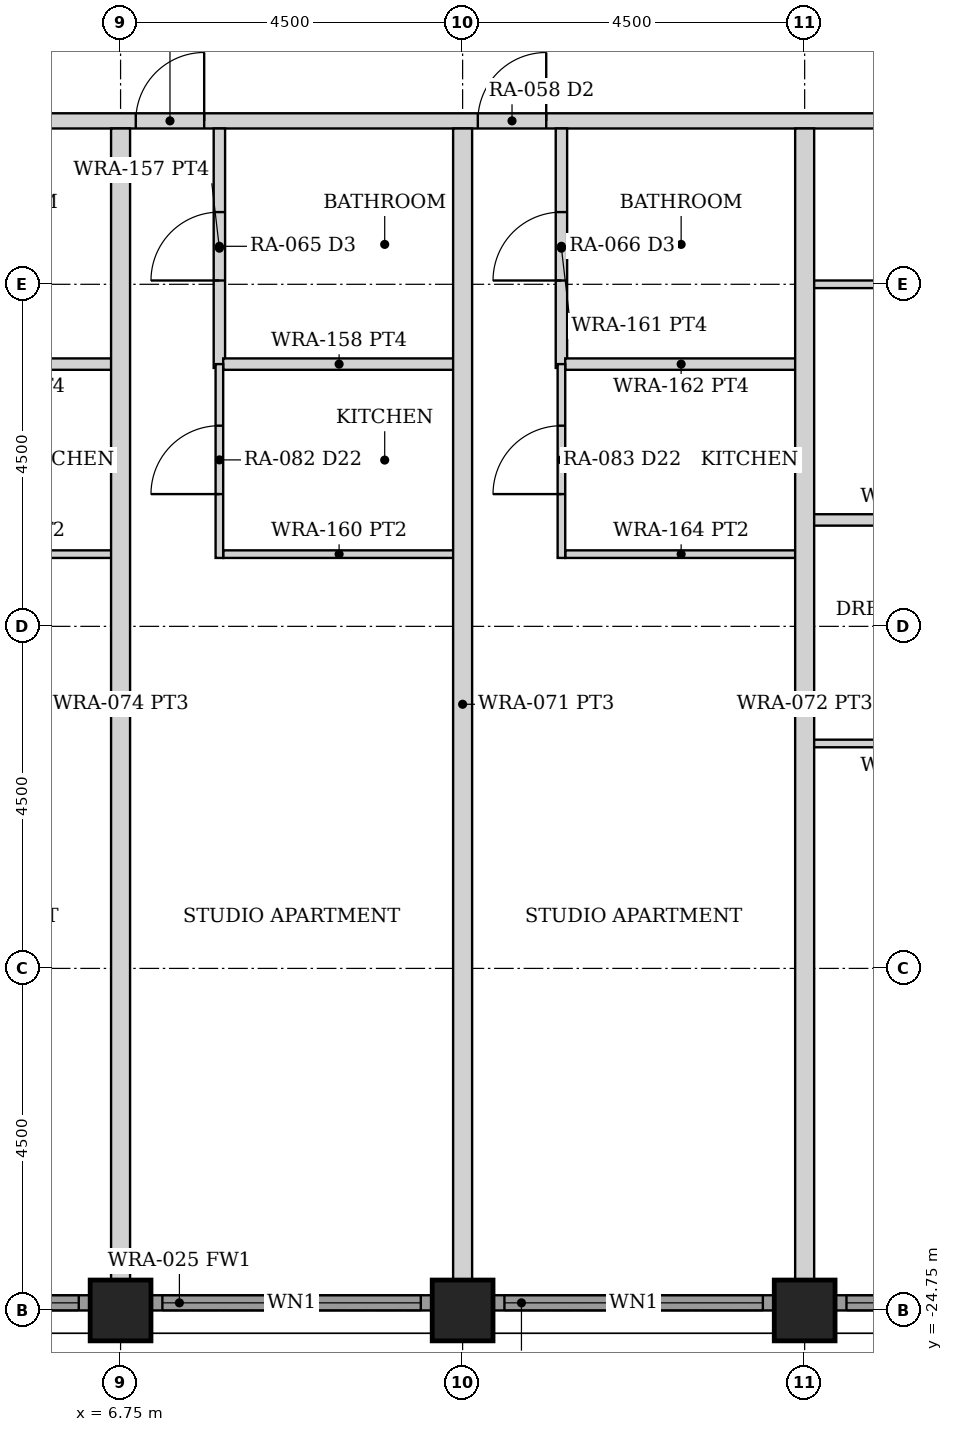
"""IFC4 building model, lengths in metres.
Left out: names, types, materials, properties, quantities, classifications, styles, units other than length and angle.
Written with IfcOpenShell. Run it as: python <this file> out.ifc"""

import sys

from ifc_helpers import new_model, si_unit, direction, frame, frame_2d, origin, origin_2d, place, context, subcontext, project, spatial, rectangle, hollow_rectangle, extrude, element, fill, save


model = new_model("IFC4")
c1 = context("Model", 3, precision=1e-05, world=origin(), true_north=direction((0.0, 1.0)))
c2 = subcontext(c1, "Body", "Model", "MODEL_VIEW")
j1 = project(units=[si_unit("LENGTHUNIT", "METRE"), si_unit("PLANEANGLEUNIT", "RADIAN")], contexts=[c1])
p1 = place(None, origin())
s1 = spatial("IfcSite", under=j1, at=p1, CompositionType="ELEMENT")
p2 = place(p1, origin())
s2 = spatial("IfcBuilding", under=s1, at=p2, CompositionType="ELEMENT")
p3 = place(p2, frame((0.0, 0.0, 30.0)))
s3 = spatial("IfcBuildingStorey", under=s2, at=p3, CompositionType="ELEMENT", Elevation=30.0)
for number, where, z_axis, x_axis in (
    (1, (6.75, -24.75, 0.0), (0.0, 0.0, 1.0), (0.0, 1.0, 0.0)),
    (2, (11.25, -24.75, 0.0), (0.0, 0.0, 1.0), (0.0, 1.0, 0.0)),
    (3, (15.75, -24.75, 0.0), (0.0, 0.0, 1.0), (0.0, 1.0, 0.0)),
):
    element("IfcColumn", number, at=place(p3, frame(where, z_axis=z_axis, x_axis=x_axis)), inside=s3, PredefinedType="COLUMN", context=c2, shape_type="SweptSolid", body=[
        extrude(hollow_rectangle(XDim=0.8, YDim=0.8, WallThickness=0.08, at=origin_2d()), origin(), (0.0, 0.0, 1.0), 3.5),
    ])
p4 = place(p3, frame((2.655, -24.65, 0.0), z_axis=(0.0, 0.0, 1.0), x_axis=(1.0, 0.0, 0.0)))
e4 = element("IfcWall", 4, at=p4, inside=s3, PredefinedType="SOLIDWALL", context=c2, shape_type="SweptSolid", body=[
    extrude(rectangle(XDim=3.69, YDim=0.2, at=frame_2d((1.845, 0.0))), origin(), (0.0, 0.0, 1.0), 2.379),
])
p5 = place(p4, frame((0.145, 0.0, 0.3)))
e5 = element("IfcOpeningElement", 5, at=p5, cuts=e4, PredefinedType="OPENING", context=c2, shape_type="SweptSolid", body=[
    extrude(rectangle(XDim=3.4, YDim=1.929, at=frame_2d((1.7, 0.964))), frame((0.0, 0.11, 0.0), z_axis=(0.0, -1.0, 0.0), x_axis=(1.0, 0.0, 0.0)), (0.0, 0.0, 1.0), 0.22),
])
p6 = place(p3, frame((7.155, -24.65, 0.0), z_axis=(0.0, 0.0, 1.0), x_axis=(1.0, 0.0, 0.0)))
e6 = element("IfcWall", 6, at=p6, inside=s3, PredefinedType="SOLIDWALL", context=c2, shape_type="SweptSolid", body=[
    extrude(rectangle(XDim=3.69, YDim=0.2, at=frame_2d((1.845, 0.0))), origin(), (0.0, 0.0, 1.0), 2.379),
])
p7 = place(p6, frame((0.145, 0.0, 0.3)))
e7 = element("IfcOpeningElement", 7, at=p7, cuts=e6, PredefinedType="OPENING", context=c2, shape_type="SweptSolid", body=[
    extrude(rectangle(XDim=3.4, YDim=1.929, at=frame_2d((1.7, 0.964))), frame((0.0, 0.11, 0.0), z_axis=(0.0, -1.0, 0.0), x_axis=(1.0, 0.0, 0.0)), (0.0, 0.0, 1.0), 0.22),
])
p8 = place(p3, frame((11.655, -24.65, 0.0), z_axis=(0.0, 0.0, 1.0), x_axis=(1.0, 0.0, 0.0)))
e8 = element("IfcWall", 8, at=p8, inside=s3, PredefinedType="SOLIDWALL", context=c2, shape_type="SweptSolid", body=[
    extrude(rectangle(XDim=3.69, YDim=0.2, at=frame_2d((1.845, 0.0))), origin(), (0.0, 0.0, 1.0), 2.379),
])
p9 = place(p8, frame((0.145, 0.0, 0.3)))
e9 = element("IfcOpeningElement", 9, at=p9, cuts=e8, PredefinedType="OPENING", context=c2, shape_type="SweptSolid", body=[
    extrude(rectangle(XDim=3.4, YDim=1.929, at=frame_2d((1.7, 0.964))), frame((0.0, 0.11, 0.0), z_axis=(0.0, -1.0, 0.0), x_axis=(1.0, 0.0, 0.0)), (0.0, 0.0, 1.0), 0.22),
])
p10 = place(p3, frame((16.155, -24.65, 0.0), z_axis=(0.0, 0.0, 1.0), x_axis=(1.0, 0.0, 0.0)))
e10 = element("IfcWall", 10, at=p10, inside=s3, PredefinedType="SOLIDWALL", context=c2, shape_type="SweptSolid", body=[
    extrude(rectangle(XDim=3.69, YDim=0.2, at=frame_2d((1.845, 0.0))), origin(), (0.0, 0.0, 1.0), 2.379),
])
p11 = place(p10, frame((0.145, 0.0, 0.3)))
e11 = element("IfcOpeningElement", 11, at=p11, cuts=e10, PredefinedType="OPENING", context=c2, shape_type="SweptSolid", body=[
    extrude(rectangle(XDim=3.4, YDim=1.929, at=frame_2d((1.7, 0.964))), frame((0.0, 0.11, 0.0), z_axis=(0.0, -1.0, 0.0), x_axis=(1.0, 0.0, 0.0)), (0.0, 0.0, 1.0), 0.22),
])
p12 = place(p3, frame((-24.55, -9.1, 0.0), z_axis=(0.0, 0.0, 1.0), x_axis=(1.0, 0.0, 0.0)))
e12 = element("IfcWall", 12, at=p12, inside=s3, PredefinedType="PARTITIONING", context=c2, shape_type="SweptSolid", body=[
    extrude(rectangle(XDim=49.1, YDim=0.2, at=frame_2d((24.55, 0.0))), origin(), (0.0, 0.0, 1.0), 2.373),
])
p13 = place(p12, frame((5.1, 0.0, 0.0)))
e13 = element("IfcOpeningElement", 13, at=p13, cuts=e12, PredefinedType="OPENING", context=c2, shape_type="SweptSolid", body=[
    extrude(rectangle(XDim=0.9, YDim=2.1, at=frame_2d((0.45, 1.05))), frame((0.0, 0.11, 0.0), z_axis=(0.0, -1.0, 0.0), x_axis=(1.0, 0.0, 0.0)), (0.0, 0.0, 1.0), 0.22),
])
p14 = place(p12, frame((9.0, 0.0, 0.0)))
e14 = element("IfcOpeningElement", 14, at=p14, cuts=e12, PredefinedType="OPENING", context=c2, shape_type="SweptSolid", body=[
    extrude(rectangle(XDim=0.9, YDim=2.1, at=frame_2d((0.45, 1.05))), frame((0.0, 0.11, 0.0), z_axis=(0.0, -1.0, 0.0), x_axis=(1.0, 0.0, 0.0)), (0.0, 0.0, 1.0), 0.22),
])
p15 = place(p12, frame((13.5, 0.0, 0.0)))
e15 = element("IfcOpeningElement", 15, at=p15, cuts=e12, PredefinedType="OPENING", context=c2, shape_type="SweptSolid", body=[
    extrude(rectangle(XDim=0.9, YDim=2.1, at=frame_2d((0.45, 1.05))), frame((0.0, 0.11, 0.0), z_axis=(0.0, -1.0, 0.0), x_axis=(1.0, 0.0, 0.0)), (0.0, 0.0, 1.0), 0.22),
])
p16 = place(p12, frame((18.0, 0.0, 0.0)))
e16 = element("IfcOpeningElement", 16, at=p16, cuts=e12, PredefinedType="OPENING", context=c2, shape_type="SweptSolid", body=[
    extrude(rectangle(XDim=0.9, YDim=2.1, at=frame_2d((0.45, 1.05))), frame((0.0, 0.11, 0.0), z_axis=(0.0, -1.0, 0.0), x_axis=(1.0, 0.0, 0.0)), (0.0, 0.0, 1.0), 0.22),
])
p17 = place(p12, frame((22.5, 0.0, 0.0)))
e17 = element("IfcOpeningElement", 17, at=p17, cuts=e12, PredefinedType="OPENING", context=c2, shape_type="SweptSolid", body=[
    extrude(rectangle(XDim=0.9, YDim=2.1, at=frame_2d((0.45, 1.05))), frame((0.0, 0.11, 0.0), z_axis=(0.0, -1.0, 0.0), x_axis=(1.0, 0.0, 0.0)), (0.0, 0.0, 1.0), 0.22),
])
p18 = place(p12, frame((27.0, 0.0, 0.0)))
e18 = element("IfcOpeningElement", 18, at=p18, cuts=e12, PredefinedType="OPENING", context=c2, shape_type="SweptSolid", body=[
    extrude(rectangle(XDim=0.9, YDim=2.1, at=frame_2d((0.45, 1.05))), frame((0.0, 0.11, 0.0), z_axis=(0.0, -1.0, 0.0), x_axis=(1.0, 0.0, 0.0)), (0.0, 0.0, 1.0), 0.22),
])
p19 = place(p12, frame((31.5, 0.0, 0.0)))
e19 = element("IfcOpeningElement", 19, at=p19, cuts=e12, PredefinedType="OPENING", context=c2, shape_type="SweptSolid", body=[
    extrude(rectangle(XDim=0.9, YDim=2.1, at=frame_2d((0.45, 1.05))), frame((0.0, 0.11, 0.0), z_axis=(0.0, -1.0, 0.0), x_axis=(1.0, 0.0, 0.0)), (0.0, 0.0, 1.0), 0.22),
])
p20 = place(p12, frame((36.0, 0.0, 0.0)))
e20 = element("IfcOpeningElement", 20, at=p20, cuts=e12, PredefinedType="OPENING", context=c2, shape_type="SweptSolid", body=[
    extrude(rectangle(XDim=0.9, YDim=2.1, at=frame_2d((0.45, 1.05))), frame((0.0, 0.11, 0.0), z_axis=(0.0, -1.0, 0.0), x_axis=(1.0, 0.0, 0.0)), (0.0, 0.0, 1.0), 0.22),
])
p21 = place(p12, frame((43.1, 0.0, 0.0)))
e21 = element("IfcOpeningElement", 21, at=p21, cuts=e12, PredefinedType="OPENING", context=c2, shape_type="SweptSolid", body=[
    extrude(rectangle(XDim=0.9, YDim=2.1, at=frame_2d((0.45, 1.05))), frame((0.0, 0.11, 0.0), z_axis=(0.0, -1.0, 0.0), x_axis=(1.0, 0.0, 0.0)), (0.0, 0.0, 1.0), 0.22),
])
p22 = place(p3, frame((3.6, -12.3, 0.0), z_axis=(0.0, 0.0, 1.0), x_axis=(1.0, 0.0, 0.0)))
e22 = element("IfcWall", 22, at=p22, inside=s3, PredefinedType="PARTITIONING", context=c2, shape_type="SweptSolid", body=[
    extrude(rectangle(XDim=3.05, YDim=0.15, at=frame_2d((1.525, 0.0))), origin(), (0.0, 0.0, 1.0), 2.373),
])
p23 = place(p3, frame((3.6, -14.8, 0.0), z_axis=(0.0, 0.0, 1.0), x_axis=(1.0, 0.0, 0.0)))
e23 = element("IfcWall", 23, at=p23, inside=s3, PredefinedType="PARTITIONING", context=c2, shape_type="SweptSolid", body=[
    extrude(rectangle(XDim=3.05, YDim=0.1, at=frame_2d((1.525, 0.0))), origin(), (0.0, 0.0, 1.0), 2.373),
])
p24 = place(p3, frame((8.05, -12.35, 0.0), z_axis=(0.0, 0.0, 1.0), x_axis=(0.0, 1.0, 0.0)))
e24 = element("IfcWall", 24, at=p24, inside=s3, PredefinedType="PARTITIONING", context=c2, shape_type="SweptSolid", body=[
    extrude(rectangle(XDim=3.15, YDim=0.15, at=frame_2d((1.575, 0.0))), origin(), (0.0, 0.0, 1.0), 2.373),
])
p25 = place(p24, frame((1.15, 0.0, 0.0)))
e25 = element("IfcOpeningElement", 25, at=p25, cuts=e24, PredefinedType="OPENING", context=c2, shape_type="SweptSolid", body=[
    extrude(rectangle(XDim=0.9, YDim=2.1, at=frame_2d((0.45, 1.05))), frame((0.0, 0.085, 0.0), z_axis=(0.0, -1.0, 0.0), x_axis=(1.0, 0.0, 0.0)), (0.0, 0.0, 1.0), 0.17),
])
p26 = place(p3, frame((8.1, -12.3, 0.0), z_axis=(0.0, 0.0, 1.0), x_axis=(1.0, 0.0, 0.0)))
e26 = element("IfcWall", 26, at=p26, inside=s3, PredefinedType="PARTITIONING", context=c2, shape_type="SweptSolid", body=[
    extrude(rectangle(XDim=3.05, YDim=0.15, at=frame_2d((1.525, 0.0))), origin(), (0.0, 0.0, 1.0), 2.373),
])
p27 = place(p3, frame((8.1, -14.8, 0.0), z_axis=(0.0, 0.0, 1.0), x_axis=(1.0, 0.0, 0.0)))
e27 = element("IfcWall", 27, at=p27, inside=s3, PredefinedType="PARTITIONING", context=c2, shape_type="SweptSolid", body=[
    extrude(rectangle(XDim=3.05, YDim=0.1, at=frame_2d((1.525, 0.0))), origin(), (0.0, 0.0, 1.0), 2.373),
])
p28 = place(p3, frame((8.05, -14.85, 0.0), z_axis=(0.0, 0.0, 1.0), x_axis=(0.0, 1.0, 0.0)))
e28 = element("IfcWall", 28, at=p28, inside=s3, PredefinedType="PARTITIONING", context=c2, shape_type="SweptSolid", body=[
    extrude(rectangle(XDim=2.55, YDim=0.1, at=frame_2d((1.275, 0.0))), origin(), (0.0, 0.0, 1.0), 2.373),
])
p29 = place(p28, frame((0.84, 0.0, 0.0)))
e29 = element("IfcOpeningElement", 29, at=p29, cuts=e28, PredefinedType="OPENING", context=c2, shape_type="SweptSolid", body=[
    extrude(rectangle(XDim=0.9, YDim=2.1, at=frame_2d((0.45, 1.05))), frame((0.0, 0.06, 0.0), z_axis=(0.0, -1.0, 0.0), x_axis=(1.0, 0.0, 0.0)), (0.0, 0.0, 1.0), 0.12),
])
p30 = place(p3, frame((12.55, -12.35, 0.0), z_axis=(0.0, 0.0, 1.0), x_axis=(0.0, 1.0, 0.0)))
e30 = element("IfcWall", 30, at=p30, inside=s3, PredefinedType="PARTITIONING", context=c2, shape_type="SweptSolid", body=[
    extrude(rectangle(XDim=3.15, YDim=0.15, at=frame_2d((1.575, 0.0))), origin(), (0.0, 0.0, 1.0), 2.373),
])
p31 = place(p30, frame((1.15, 0.0, 0.0)))
e31 = element("IfcOpeningElement", 31, at=p31, cuts=e30, PredefinedType="OPENING", context=c2, shape_type="SweptSolid", body=[
    extrude(rectangle(XDim=0.9, YDim=2.1, at=frame_2d((0.45, 1.05))), frame((0.0, 0.085, 0.0), z_axis=(0.0, -1.0, 0.0), x_axis=(1.0, 0.0, 0.0)), (0.0, 0.0, 1.0), 0.17),
])
p32 = place(p3, frame((12.6, -12.3, 0.0), z_axis=(0.0, 0.0, 1.0), x_axis=(1.0, 0.0, 0.0)))
e32 = element("IfcWall", 32, at=p32, inside=s3, PredefinedType="PARTITIONING", context=c2, shape_type="SweptSolid", body=[
    extrude(rectangle(XDim=3.05, YDim=0.15, at=frame_2d((1.525, 0.0))), origin(), (0.0, 0.0, 1.0), 2.373),
])
p33 = place(p3, frame((12.6, -14.8, 0.0), z_axis=(0.0, 0.0, 1.0), x_axis=(1.0, 0.0, 0.0)))
e33 = element("IfcWall", 33, at=p33, inside=s3, PredefinedType="PARTITIONING", context=c2, shape_type="SweptSolid", body=[
    extrude(rectangle(XDim=3.05, YDim=0.1, at=frame_2d((1.525, 0.0))), origin(), (0.0, 0.0, 1.0), 2.373),
])
p34 = place(p3, frame((12.55, -14.85, 0.0), z_axis=(0.0, 0.0, 1.0), x_axis=(0.0, 1.0, 0.0)))
e34 = element("IfcWall", 34, at=p34, inside=s3, PredefinedType="PARTITIONING", context=c2, shape_type="SweptSolid", body=[
    extrude(rectangle(XDim=2.55, YDim=0.1, at=frame_2d((1.275, 0.0))), origin(), (0.0, 0.0, 1.0), 2.373),
])
p35 = place(p34, frame((0.84, 0.0, 0.0)))
e35 = element("IfcOpeningElement", 35, at=p35, cuts=e34, PredefinedType="OPENING", context=c2, shape_type="SweptSolid", body=[
    extrude(rectangle(XDim=0.9, YDim=2.1, at=frame_2d((0.45, 1.05))), frame((0.0, 0.06, 0.0), z_axis=(0.0, -1.0, 0.0), x_axis=(1.0, 0.0, 0.0)), (0.0, 0.0, 1.0), 0.12),
])
p36 = place(p3, frame((15.85, -11.25, 0.0), z_axis=(0.0, 0.0, 1.0), x_axis=(1.0, 0.0, 0.0)))
e36 = element("IfcWall", 36, at=p36, inside=s3, PredefinedType="PARTITIONING", context=c2, shape_type="SweptSolid", body=[
    extrude(rectangle(XDim=8.5, YDim=0.1, at=frame_2d((4.25, 0.0))), origin(), (0.0, 0.0, 1.0), 2.373),
])
p37 = place(p36, frame((5.225, 0.0, 0.0)))
e37 = element("IfcOpeningElement", 37, at=p37, cuts=e36, PredefinedType="OPENING", context=c2, shape_type="SweptSolid", body=[
    extrude(rectangle(XDim=0.9, YDim=2.1, at=frame_2d((0.45, 1.05))), frame((0.0, 0.06, 0.0), z_axis=(0.0, -1.0, 0.0), x_axis=(1.0, 0.0, 0.0)), (0.0, 0.0, 1.0), 0.12),
])
p38 = place(p36, frame((7.25, 0.0, 0.0)))
e38 = element("IfcOpeningElement", 38, at=p38, cuts=e36, PredefinedType="OPENING", context=c2, shape_type="SweptSolid", body=[
    extrude(rectangle(XDim=0.9, YDim=2.1, at=frame_2d((0.45, 1.05))), frame((0.0, 0.06, 0.0), z_axis=(0.0, -1.0, 0.0), x_axis=(1.0, 0.0, 0.0)), (0.0, 0.0, 1.0), 0.12),
])
p39 = place(p36, frame((3.325, 0.0, 0.0)))
e39 = element("IfcOpeningElement", 39, at=p39, cuts=e36, PredefinedType="OPENING", context=c2, shape_type="SweptSolid", body=[
    extrude(rectangle(XDim=0.85, YDim=2.1, at=frame_2d((0.425, 1.05))), frame((0.0, 0.06, 0.0), z_axis=(0.0, -1.0, 0.0), x_axis=(1.0, 0.0, 0.0)), (0.0, 0.0, 1.0), 0.12),
])
p40 = place(p36, frame((1.08, 0.0, 0.0)))
e40 = element("IfcOpeningElement", 40, at=p40, cuts=e36, PredefinedType="OPENING", context=c2, shape_type="SweptSolid", body=[
    extrude(rectangle(XDim=0.9, YDim=2.1, at=frame_2d((0.45, 1.05))), frame((0.0, 0.06, 0.0), z_axis=(0.0, -1.0, 0.0), x_axis=(1.0, 0.0, 0.0)), (0.0, 0.0, 1.0), 0.12),
])
p41 = place(p3, frame((15.81, -14.35, 0.0), z_axis=(0.0, 0.0, 1.0), x_axis=(1.0, 0.0, 0.0)))
e41 = element("IfcWall", 41, at=p41, inside=s3, PredefinedType="PARTITIONING", context=c2, shape_type="SweptSolid", body=[
    extrude(rectangle(XDim=3.14, YDim=0.15, at=frame_2d((1.57, 0.0))), origin(), (0.0, 0.0, 1.0), 2.373),
])
p42 = place(p3, frame((15.81, -17.291, 0.0), z_axis=(0.0, 0.0, 1.0), x_axis=(1.0, 0.0, 0.0)))
e42 = element("IfcWall", 42, at=p42, inside=s3, PredefinedType="PARTITIONING", context=c2, shape_type="SweptSolid", body=[
    extrude(rectangle(XDim=3.14, YDim=0.1, at=frame_2d((1.57, 0.0))), origin(), (0.0, 0.0, 1.0), 2.373),
])
for number, where, z_axis, x_axis in (
    (43, (6.75, -24.35, 0.0), (0.0, 0.0, 1.0), (0.0, 1.0, 0.0)),
    (44, (11.25, -24.35, 0.0), (0.0, 0.0, 1.0), (0.0, 1.0, 0.0)),
    (45, (15.75, -24.35, 0.0), (0.0, 0.0, 1.0), (0.0, 1.0, 0.0)),
):
    element("IfcWall", number, at=place(p3, frame(where, z_axis=z_axis, x_axis=x_axis)), inside=s3, PredefinedType="PARTITIONING", context=c2, shape_type="SweptSolid", body=[
        extrude(rectangle(XDim=15.15, YDim=0.25, at=frame_2d((7.575, 0.0))), origin(), (0.0, 0.0, 1.0), 2.373),
    ])
p43 = place(p5, origin())
e46 = element("IfcWindow", 46, at=p43, inside=s3, PartitioningType="SINGLE_PANEL", PredefinedType="WINDOW", context=c2, shape_type="SweptSolid", body=[
    extrude(rectangle(XDim=3.4, YDim=1.929, at=frame_2d((1.7, 0.964))), frame((0.0, 0.03, 0.0), z_axis=(0.0, -1.0, 0.0), x_axis=(1.0, 0.0, 0.0)), (0.0, 0.0, 1.0), 0.06),
])
fill(e5, e46)
p44 = place(p7, origin())
e47 = element("IfcWindow", 47, at=p44, inside=s3, PartitioningType="SINGLE_PANEL", PredefinedType="WINDOW", context=c2, shape_type="SweptSolid", body=[
    extrude(rectangle(XDim=3.4, YDim=1.929, at=frame_2d((1.7, 0.964))), frame((0.0, 0.03, 0.0), z_axis=(0.0, -1.0, 0.0), x_axis=(1.0, 0.0, 0.0)), (0.0, 0.0, 1.0), 0.06),
])
fill(e7, e47)
p45 = place(p9, origin())
e48 = element("IfcWindow", 48, at=p45, inside=s3, PartitioningType="SINGLE_PANEL", PredefinedType="WINDOW", context=c2, shape_type="SweptSolid", body=[
    extrude(rectangle(XDim=3.4, YDim=1.929, at=frame_2d((1.7, 0.964))), frame((0.0, 0.03, 0.0), z_axis=(0.0, -1.0, 0.0), x_axis=(1.0, 0.0, 0.0)), (0.0, 0.0, 1.0), 0.06),
])
fill(e9, e48)
p46 = place(p11, origin())
e49 = element("IfcWindow", 49, at=p46, inside=s3, PartitioningType="SINGLE_PANEL", PredefinedType="WINDOW", context=c2, shape_type="SweptSolid", body=[
    extrude(rectangle(XDim=3.4, YDim=1.929, at=frame_2d((1.7, 0.964))), frame((0.0, 0.03, 0.0), z_axis=(0.0, -1.0, 0.0), x_axis=(1.0, 0.0, 0.0)), (0.0, 0.0, 1.0), 0.06),
])
fill(e11, e49)
p47 = place(p19, origin())
e50 = element("IfcDoor", 50, at=p47, inside=s3, OperationType="SINGLE_SWING_RIGHT", PredefinedType="DOOR", context=c2, shape_type="SweptSolid", body=[
    extrude(rectangle(XDim=0.9, YDim=2.1, at=frame_2d((0.45, 1.05))), frame((0.0, 0.025, 0.0), z_axis=(0.0, -1.0, 0.0), x_axis=(1.0, 0.0, 0.0)), (0.0, 0.0, 1.0), 0.05),
])
fill(e19, e50)
p48 = place(p25, origin())
e51 = element("IfcDoor", 51, at=p48, inside=s3, OperationType="SINGLE_SWING_LEFT", PredefinedType="DOOR", context=c2, shape_type="SweptSolid", body=[
    extrude(rectangle(XDim=0.9, YDim=2.1, at=frame_2d((0.45, 1.05))), frame((0.0, 0.025, 0.0), z_axis=(0.0, -1.0, 0.0), x_axis=(1.0, 0.0, 0.0)), (0.0, 0.0, 1.0), 0.05),
])
fill(e25, e51)
p49 = place(p29, origin())
e52 = element("IfcDoor", 52, at=p49, inside=s3, OperationType="SINGLE_SWING_LEFT", PredefinedType="DOOR", context=c2, shape_type="SweptSolid", body=[
    extrude(rectangle(XDim=0.9, YDim=2.1, at=frame_2d((0.45, 1.05))), frame((0.0, 0.025, 0.0), z_axis=(0.0, -1.0, 0.0), x_axis=(1.0, 0.0, 0.0)), (0.0, 0.0, 1.0), 0.05),
])
fill(e29, e52)
p50 = place(p20, origin())
e53 = element("IfcDoor", 53, at=p50, inside=s3, OperationType="SINGLE_SWING_RIGHT", PredefinedType="DOOR", context=c2, shape_type="SweptSolid", body=[
    extrude(rectangle(XDim=0.9, YDim=2.1, at=frame_2d((0.45, 1.05))), frame((0.0, 0.025, 0.0), z_axis=(0.0, -1.0, 0.0), x_axis=(1.0, 0.0, 0.0)), (0.0, 0.0, 1.0), 0.05),
])
fill(e20, e53)
p51 = place(p31, origin())
e54 = element("IfcDoor", 54, at=p51, inside=s3, OperationType="SINGLE_SWING_LEFT", PredefinedType="DOOR", context=c2, shape_type="SweptSolid", body=[
    extrude(rectangle(XDim=0.9, YDim=2.1, at=frame_2d((0.45, 1.05))), frame((0.0, 0.025, 0.0), z_axis=(0.0, -1.0, 0.0), x_axis=(1.0, 0.0, 0.0)), (0.0, 0.0, 1.0), 0.05),
])
fill(e31, e54)
p52 = place(p35, origin())
e55 = element("IfcDoor", 55, at=p52, inside=s3, OperationType="SINGLE_SWING_LEFT", PredefinedType="DOOR", context=c2, shape_type="SweptSolid", body=[
    extrude(rectangle(XDim=0.9, YDim=2.1, at=frame_2d((0.45, 1.05))), frame((0.0, 0.025, 0.0), z_axis=(0.0, -1.0, 0.0), x_axis=(1.0, 0.0, 0.0)), (0.0, 0.0, 1.0), 0.05),
])
fill(e35, e55)
save(model, sys.argv[1])
